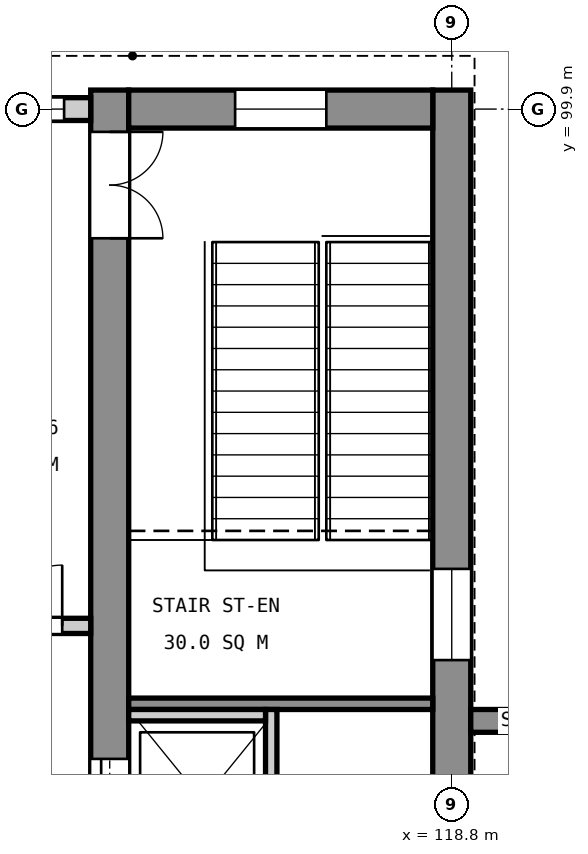
"""IFC4 building model, lengths in metres.
Left out: names, types, materials, properties, quantities, classifications, styles, units other than length and angle.
Written with IfcOpenShell. Run it as: python <this file> out.ifc"""

import sys

from ifc_helpers import new_model, si_unit, direction, frame, frame_2d, origin, place, context, subcontext, project, spatial, rectangle, extrude, element, fill, save


model = new_model("IFC4")
c1 = context("Model", 3, precision=1e-05, world=origin(), true_north=direction((0.0, 1.0)))
c2 = subcontext(c1, "Body", "Model", "MODEL_VIEW")
j1 = project(units=[si_unit("LENGTHUNIT", "METRE"), si_unit("PLANEANGLEUNIT", "RADIAN")], contexts=[c1])
p1 = place(None, origin())
s1 = spatial("IfcSite", under=j1, at=p1, CompositionType="ELEMENT")
p2 = place(p1, origin())
s2 = spatial("IfcBuilding", under=s1, at=p2, CompositionType="ELEMENT")
p3 = place(p2, frame((0.0, 0.0, 11.4)))
s3 = spatial("IfcBuildingStorey", under=s2, at=p3, CompositionType="ELEMENT", Elevation=11.4)
p4 = place(p3, frame((118.8, 88.85, 0.0), z_axis=(0.0, 0.0, 1.0), x_axis=(0.0, 1.0, 0.0)))
e1 = element("IfcWall", 1, at=p4, inside=s3, PredefinedType="SHEAR", context=c2, shape_type="SweptSolid", body=[
    extrude(rectangle(XDim=11.3, YDim=0.5, at=frame_2d((5.65, 0.0))), origin(), (0.0, 0.0, 1.0), 5.1),
])
p5 = place(p4, frame((3.8, 0.0, 3.4)))
e2 = element("IfcOpeningElement", 2, at=p5, cuts=e1, PredefinedType="OPENING", context=c2, shape_type="SweptSolid", body=[
    extrude(rectangle(XDim=1.2, YDim=0.9, at=frame_2d((0.6, 0.45))), frame((0.0, 0.26, 0.0), z_axis=(0.0, -1.0, 0.0), x_axis=(1.0, 0.0, 0.0)), (0.0, 0.0, 1.0), 0.52),
])
p6 = place(p3, frame((114.3, 88.85, 0.0), z_axis=(0.0, 0.0, 1.0), x_axis=(0.0, 1.0, 0.0)))
e3 = element("IfcWall", 3, at=p6, inside=s3, PredefinedType="SHEAR", context=c2, shape_type="SweptSolid", body=[
    extrude(rectangle(XDim=11.3, YDim=0.5, at=frame_2d((5.65, 0.0))), origin(), (0.0, 0.0, 1.0), 5.1),
])
p7 = place(p6, frame((9.35, 0.0, 0.0)))
e4 = element("IfcOpeningElement", 4, at=p7, cuts=e3, PredefinedType="OPENING", context=c2, shape_type="SweptSolid", body=[
    extrude(rectangle(XDim=1.4, YDim=2.1, at=frame_2d((0.7, 1.05))), frame((0.0, 0.26, 0.0), z_axis=(0.0, -1.0, 0.0), x_axis=(1.0, 0.0, 0.0)), (0.0, 0.0, 1.0), 0.52),
])
p8 = place(p6, frame((1.4, 0.0, 0.0)))
e5 = element("IfcOpeningElement", 5, at=p8, cuts=e3, PredefinedType="OPENING", context=c2, shape_type="SweptSolid", body=[
    extrude(rectangle(XDim=1.1, YDim=2.1, at=frame_2d((0.55, 1.05))), frame((0.0, 0.26, 0.0), z_axis=(0.0, -1.0, 0.0), x_axis=(1.0, 0.0, 0.0)), (0.0, 0.0, 1.0), 0.52),
])
p9 = place(p3, frame((118.55, 99.9, 0.0), z_axis=(0.0, 0.0, 1.0), x_axis=(-1.0, 0.0, 0.0)))
e6 = element("IfcWall", 6, at=p9, inside=s3, PredefinedType="SHEAR", context=c2, shape_type="SweptSolid", body=[
    extrude(rectangle(XDim=4.0, YDim=0.5, at=frame_2d((2.0, 0.0))), origin(), (0.0, 0.0, 1.0), 5.1),
])
p10 = place(p9, frame((1.4, 0.0, 3.4)))
e7 = element("IfcOpeningElement", 7, at=p10, cuts=e6, PredefinedType="OPENING", context=c2, shape_type="SweptSolid", body=[
    extrude(rectangle(XDim=1.2, YDim=0.9, at=frame_2d((0.6, 0.45))), frame((0.0, 0.26, 0.0), z_axis=(0.0, -1.0, 0.0), x_axis=(1.0, 0.0, 0.0)), (0.0, 0.0, 1.0), 0.52),
])
p11 = place(p3, frame((119.05, 91.85, 0.0), z_axis=(0.0, 0.0, 1.0), x_axis=(1.0, 0.0, 0.0)))
e8 = element("IfcWall", 8, at=p11, inside=s3, PredefinedType="SHEAR", context=c2, shape_type="SweptSolid", body=[
    extrude(rectangle(XDim=1.25, YDim=0.3, at=frame_2d((0.625, 0.0))), origin(), (0.0, 0.0, 1.0), 5.4),
])
p12 = place(p3, frame((118.55, 92.075, 0.0), z_axis=(0.0, 0.0, 1.0), x_axis=(-1.0, 0.0, 0.0)))
e9 = element("IfcWall", 9, at=p12, inside=s3, PredefinedType="SOLIDWALL", context=c2, shape_type="SweptSolid", body=[
    extrude(rectangle(XDim=4.0, YDim=0.15, at=frame_2d((2.0, 0.0))), origin(), (0.0, 0.0, 1.0), 5.1),
])
p13 = place(p3, frame((116.425, 92.0, 0.0), z_axis=(0.0, 0.0, 1.0), x_axis=(0.0, -1.0, 0.0)))
e10 = element("IfcWall", 10, at=p13, inside=s3, PredefinedType="SOLIDWALL", context=c2, shape_type="SweptSolid", body=[
    extrude(rectangle(XDim=2.65, YDim=0.15, at=frame_2d((1.325, 0.0))), origin(), (0.0, 0.0, 1.0), 5.4),
])
p14 = place(p3, frame((116.35, 91.925, 0.0), z_axis=(0.0, 0.0, 1.0), x_axis=(-1.0, 0.0, 0.0)))
e11 = element("IfcWall", 11, at=p14, inside=s3, PredefinedType="SOLIDWALL", context=c2, shape_type="SweptSolid", body=[
    extrude(rectangle(XDim=1.8, YDim=0.15, at=frame_2d((0.9, 0.0))), origin(), (0.0, 0.0, 1.0), 5.4),
])
p15 = place(p3, frame((114.05, 99.9, 0.0), z_axis=(0.0, 0.0, 1.0), x_axis=(-1.0, 0.0, 0.0)))
e12 = element("IfcWall", 12, at=p15, inside=s3, PredefinedType="STANDARD", context=c2, shape_type="SweptSolid", body=[
    extrude(rectangle(XDim=1.9, YDim=0.3, at=frame_2d((0.95, 0.0))), origin(), (0.0, 0.0, 1.0), 4.3),
])
p16 = place(p15, frame((0.35, 0.0, 0.9)))
e13 = element("IfcOpeningElement", 13, at=p16, cuts=e12, PredefinedType="OPENING", context=c2, shape_type="SweptSolid", body=[
    extrude(rectangle(XDim=1.2, YDim=2.4, at=frame_2d((0.6, 1.2))), frame((0.0, 0.16, 0.0), z_axis=(0.0, -1.0, 0.0), x_axis=(1.0, 0.0, 0.0)), (0.0, 0.0, 1.0), 0.32),
])
p17 = place(p3, frame((114.05, 93.1, 0.0), z_axis=(0.0, 0.0, 1.0), x_axis=(-1.0, 0.0, 0.0)))
e14 = element("IfcWall", 14, at=p17, inside=s3, PredefinedType="PARTITIONING", context=c2, shape_type="SweptSolid", body=[
    extrude(rectangle(XDim=2.35, YDim=0.2, at=frame_2d((1.175, 0.0))), origin(), (0.0, 0.0, 1.0), 4.0),
])
p18 = place(p17, frame((0.375, 0.0, 0.0)))
e15 = element("IfcOpeningElement", 15, at=p18, cuts=e14, PredefinedType="OPENING", context=c2, shape_type="SweptSolid", body=[
    extrude(rectangle(XDim=1.6, YDim=2.1, at=frame_2d((0.8, 1.05))), frame((0.0, 0.11, 0.0), z_axis=(0.0, -1.0, 0.0), x_axis=(1.0, 0.0, 0.0)), (0.0, 0.0, 1.0), 0.22),
])
p19 = place(p7, frame((1.4, 0.0, 0.0), z_axis=(0.0, 0.0, 1.0), x_axis=(-1.0, 0.0, 0.0)))
e16 = element("IfcDoor", 16, at=p19, inside=s3, OperationType="DOUBLE_DOOR_SINGLE_SWING", PredefinedType="DOOR", context=c2, shape_type="SweptSolid", body=[
    extrude(rectangle(XDim=1.4, YDim=2.1, at=frame_2d((0.7, 1.05))), frame((0.0, 0.025, 0.0), z_axis=(0.0, -1.0, 0.0), x_axis=(1.0, 0.0, 0.0)), (0.0, 0.0, 1.0), 0.05),
])
fill(e4, e16)
p20 = place(p8, origin())
e17 = element("IfcDoor", 17, at=p20, inside=s3, OperationType="SLIDING_TO_LEFT", PredefinedType="DOOR", context=c2, shape_type="SweptSolid", body=[
    extrude(rectangle(XDim=1.1, YDim=2.1, at=frame_2d((0.55, 1.05))), frame((0.0, 0.025, 0.0), z_axis=(0.0, -1.0, 0.0), x_axis=(1.0, 0.0, 0.0)), (0.0, 0.0, 1.0), 0.05),
])
fill(e5, e17)
p21 = place(p16, origin())
e18 = element("IfcWindow", 18, at=p21, inside=s3, PartitioningType="SINGLE_PANEL", PredefinedType="WINDOW", context=c2, shape_type="SweptSolid", body=[
    extrude(rectangle(XDim=1.2, YDim=2.4, at=frame_2d((0.6, 1.2))), frame((0.0, 0.03, 0.0), z_axis=(0.0, -1.0, 0.0), x_axis=(1.0, 0.0, 0.0)), (0.0, 0.0, 1.0), 0.06),
])
fill(e13, e18)
p22 = place(p5, origin())
e19 = element("IfcWindow", 19, at=p22, inside=s3, PartitioningType="SINGLE_PANEL", PredefinedType="WINDOW", context=c2, shape_type="SweptSolid", body=[
    extrude(rectangle(XDim=1.2, YDim=0.9, at=frame_2d((0.6, 0.45))), frame((0.0, 0.03, 0.0), z_axis=(0.0, -1.0, 0.0), x_axis=(1.0, 0.0, 0.0)), (0.0, 0.0, 1.0), 0.06),
])
fill(e2, e19)
p23 = place(p10, origin())
e20 = element("IfcWindow", 20, at=p23, inside=s3, PartitioningType="SINGLE_PANEL", PredefinedType="WINDOW", context=c2, shape_type="SweptSolid", body=[
    extrude(rectangle(XDim=1.2, YDim=0.9, at=frame_2d((0.6, 0.45))), frame((0.0, 0.03, 0.0), z_axis=(0.0, -1.0, 0.0), x_axis=(1.0, 0.0, 0.0)), (0.0, 0.0, 1.0), 0.06),
])
fill(e7, e20)
p24 = place(p18, frame((1.6, 0.0, 0.0), z_axis=(0.0, 0.0, 1.0), x_axis=(-1.0, 0.0, 0.0)))
e21 = element("IfcDoor", 21, at=p24, inside=s3, OperationType="DOUBLE_DOOR_SINGLE_SWING", PredefinedType="DOOR", context=c2, shape_type="SweptSolid", body=[
    extrude(rectangle(XDim=1.6, YDim=2.1, at=frame_2d((0.8, 1.05))), frame((0.0, 0.025, 0.0), z_axis=(0.0, -1.0, 0.0), x_axis=(1.0, 0.0, 0.0)), (0.0, 0.0, 1.0), 0.05),
])
fill(e15, e21)
save(model, sys.argv[1])
